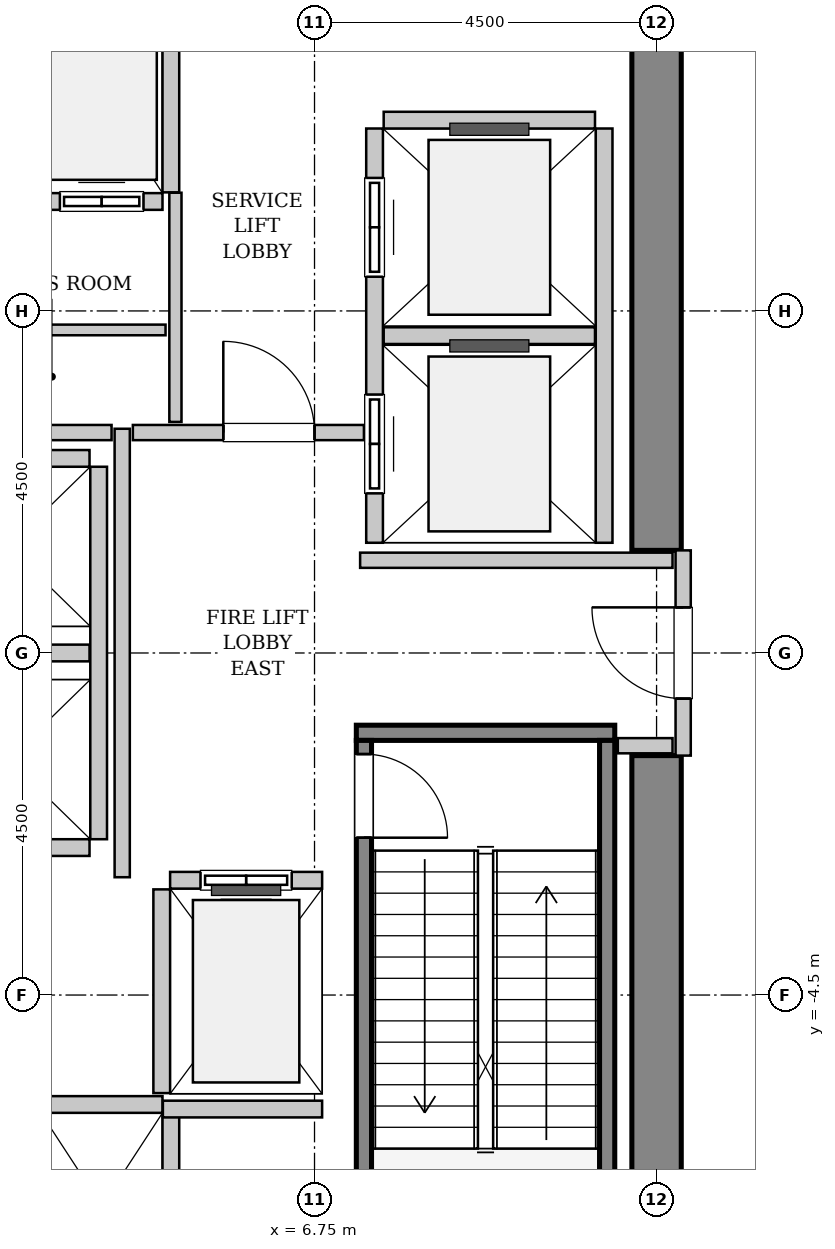
"""IFC4 building model, lengths in metres.
Left out: names, types, materials, properties, quantities, classifications, styles, units other than length and angle.
Written with IfcOpenShell. Run it as: python <this file> out.ifc"""

import sys

from ifc_helpers import new_model, si_unit, direction, frame, frame_2d, origin, place, context, subcontext, project, spatial, rectangle, extrude, source, transform, mapped, element, fill, save


model = new_model("IFC4")
c1 = context("Model", 3, precision=1e-05, world=origin(), true_north=direction((0.0, 1.0)))
c2 = subcontext(c1, "Body", "Model", "MODEL_VIEW")
j1 = project(units=[si_unit("LENGTHUNIT", "METRE"), si_unit("PLANEANGLEUNIT", "RADIAN")], contexts=[c1])
p1 = place(None, origin())
s1 = spatial("IfcSite", under=j1, at=p1, CompositionType="ELEMENT")
p2 = place(p1, origin())
s2 = spatial("IfcBuilding", under=s1, at=p2, CompositionType="ELEMENT")
p3 = place(p2, frame((0.0, 0.0, 6.0)))
s3 = spatial("IfcBuildingStorey", under=s2, at=p3, CompositionType="ELEMENT", Elevation=6.0)
m1 = source(origin(), c2, "Body", "SweptSolid", [
    extrude(rectangle(XDim=7.325, YDim=0.65, at=frame_2d((3.663, 0.0))), origin(), (0.0, 0.0, 1.0), 5.4),
])
for number, where, z_axis, x_axis in (
    (1, (11.25, -8.675, 0.0), (0.0, 0.0, 1.0), (0.0, 1.0, 0.0)),
    (2, (11.25, 1.35, 0.0), (0.0, 0.0, 1.0), (0.0, 1.0, 0.0)),
):
    element("IfcWall", number, at=place(p3, frame(where, z_axis=z_axis, x_axis=x_axis)), inside=s3, PredefinedType="SHEAR", context=c2, shape_type="MappedRepresentation", body=[
        mapped(m1, transform((0.0, 0.0, 0.0), x_axis=(1.0, 0.0, 0.0), y_axis=(0.0, 1.0, 0.0), z_axis=(0.0, 0.0, 1.0), scale=1.0)),
    ])
m2 = source(origin(), c2, "Body", "SweptSolid", [
    extrude(rectangle(XDim=3.4, YDim=0.2, at=frame_2d((1.7, 0.0))), origin(), (0.0, 0.0, 1.0), 5.4),
])
p4 = place(p3, frame((7.3, -1.05, 0.0), z_axis=(0.0, 0.0, 1.0), x_axis=(1.0, 0.0, 0.0)))
e3 = element("IfcWall", 3, at=p4, inside=s3, PredefinedType="SOLIDWALL", context=c2, shape_type="MappedRepresentation", body=[
    mapped(m2, transform((0.0, 0.0, 0.0), x_axis=(1.0, 0.0, 0.0), y_axis=(0.0, 1.0, 0.0), z_axis=(0.0, 0.0, 1.0), scale=1.0)),
])
m3 = source(origin(), c2, "Body", "SweptSolid", [
    extrude(rectangle(XDim=7.1, YDim=0.2, at=frame_2d((3.55, 0.0))), origin(), (0.0, 0.0, 1.0), 5.4),
])
p5 = place(p3, frame((7.4, -1.15, 0.0), z_axis=(0.0, 0.0, 1.0), x_axis=(0.0, -1.0, 0.0)))
e4 = element("IfcWall", 4, at=p5, inside=s3, PredefinedType="SOLIDWALL", context=c2, shape_type="MappedRepresentation", body=[
    mapped(m3, transform((0.0, 0.0, 0.0), x_axis=(1.0, 0.0, 0.0), y_axis=(0.0, 1.0, 0.0), z_axis=(0.0, 0.0, 1.0), scale=1.0)),
])
p6 = place(p5, frame((0.18, 0.0, 0.0)))
e5 = element("IfcOpeningElement", 5, at=p6, cuts=e4, PredefinedType="OPENING", context=c2, shape_type="SweptSolid", body=[
    extrude(rectangle(XDim=1.1, YDim=2.15, at=frame_2d((0.55, 1.075))), frame((0.0, 0.11, 0.0), z_axis=(0.0, -1.0, 0.0), x_axis=(1.0, 0.0, 0.0)), (0.0, 0.0, 1.0), 0.22),
])
p7 = place(p3, frame((10.6, -1.15, 0.0), z_axis=(0.0, 0.0, 1.0), x_axis=(0.0, -1.0, 0.0)))
e6 = element("IfcWall", 6, at=p7, inside=s3, PredefinedType="SOLIDWALL", context=c2, shape_type="MappedRepresentation", body=[
    mapped(m3, transform((0.0, 0.0, 0.0), x_axis=(1.0, 0.0, 0.0), y_axis=(0.0, 1.0, 0.0), z_axis=(0.0, 0.0, 1.0), scale=1.0)),
])
m4 = source(origin(), c2, "Body", "SweptSolid", [
    extrude(rectangle(XDim=2.0, YDim=0.22, at=frame_2d((1.0, 0.0))), origin(), (0.0, 0.0, 1.0), 5.085),
])
p8 = place(p3, frame((6.85, -2.99, 0.0), z_axis=(0.0, 0.0, 1.0), x_axis=(-1.0, 0.0, 0.0)))
e7 = element("IfcWall", 7, at=p8, inside=s3, PredefinedType="SOLIDWALL", context=c2, shape_type="MappedRepresentation", body=[
    mapped(m4, transform((0.0, 0.0, 0.0), x_axis=(1.0, 0.0, 0.0), y_axis=(0.0, 1.0, 0.0), z_axis=(0.0, 0.0, 1.0), scale=1.0)),
])
p9 = place(p8, frame((0.4, 0.0, 0.0)))
e8 = element("IfcOpeningElement", 8, at=p9, cuts=e7, PredefinedType="OPENING", context=c2, shape_type="SweptSolid", body=[
    extrude(rectangle(XDim=1.2, YDim=2.2, at=frame_2d((0.6, 1.1))), frame((0.0, 0.12, 0.0), z_axis=(0.0, -1.0, 0.0), x_axis=(1.0, 0.0, 0.0)), (0.0, 0.0, 1.0), 0.24),
])
m5 = source(origin(), c2, "Body", "SweptSolid", [
    extrude(rectangle(XDim=2.68, YDim=0.22, at=frame_2d((1.34, 0.0))), origin(), (0.0, 0.0, 1.0), 5.085),
])
p10 = place(p3, frame((4.74, -3.11, 0.0), z_axis=(0.0, 0.0, 1.0), x_axis=(0.0, -1.0, 0.0)))
e9 = element("IfcWall", 9, at=p10, inside=s3, PredefinedType="SOLIDWALL", context=c2, shape_type="MappedRepresentation", body=[
    mapped(m5, transform((0.0, 0.0, 0.0), x_axis=(1.0, 0.0, 0.0), y_axis=(0.0, 1.0, 0.0), z_axis=(0.0, 0.0, 1.0), scale=1.0)),
])
m6 = source(origin(), c2, "Body", "SweptSolid", [
    extrude(rectangle(XDim=5.45, YDim=0.22, at=frame_2d((2.725, 0.0))), origin(), (0.0, 0.0, 1.0), 5.085),
])
p11 = place(p3, frame((7.54, 6.9, 0.0), z_axis=(0.0, 0.0, 1.0), x_axis=(0.0, -1.0, 0.0)))
e10 = element("IfcWall", 10, at=p11, inside=s3, PredefinedType="SOLIDWALL", context=c2, shape_type="MappedRepresentation", body=[
    mapped(m6, transform((0.0, 0.0, 0.0), x_axis=(1.0, 0.0, 0.0), y_axis=(0.0, 1.0, 0.0), z_axis=(0.0, 0.0, 1.0), scale=1.0)),
])
p12 = place(p11, frame((3.5, 0.0, 0.0)))
e11 = element("IfcOpeningElement", 11, at=p12, cuts=e10, PredefinedType="OPENING", context=c2, shape_type="SweptSolid", body=[
    extrude(rectangle(XDim=1.3, YDim=2.3, at=frame_2d((0.65, 1.15))), frame((0.0, 0.12, 0.0), z_axis=(0.0, -1.0, 0.0), x_axis=(1.0, 0.0, 0.0)), (0.0, 0.0, 1.0), 0.24),
])
p13 = place(p11, frame((0.65, 0.0, 0.0)))
e12 = element("IfcOpeningElement", 12, at=p13, cuts=e10, PredefinedType="OPENING", context=c2, shape_type="SweptSolid", body=[
    extrude(rectangle(XDim=1.3, YDim=2.3, at=frame_2d((0.65, 1.15))), frame((0.0, 0.12, 0.0), z_axis=(0.0, -1.0, 0.0), x_axis=(1.0, 0.0, 0.0)), (0.0, 0.0, 1.0), 0.24),
])
p14 = place(p3, frame((10.56, 1.45, 0.0), z_axis=(0.0, 0.0, 1.0), x_axis=(0.0, 1.0, 0.0)))
e13 = element("IfcWall", 13, at=p14, inside=s3, PredefinedType="SOLIDWALL", context=c2, shape_type="MappedRepresentation", body=[
    mapped(m6, transform((0.0, 0.0, 0.0), x_axis=(1.0, 0.0, 0.0), y_axis=(0.0, 1.0, 0.0), z_axis=(0.0, 0.0, 1.0), scale=1.0)),
])
m7 = source(origin(), c2, "Body", "SweptSolid", [
    extrude(rectangle(XDim=2.78, YDim=0.22, at=frame_2d((1.39, 0.0))), origin(), (0.0, 0.0, 1.0), 5.085),
])
for number, where, z_axis, x_axis in (
    (14, (7.66, 4.175, 0.0), (0.0, 0.0, 1.0), (1.0, 0.0, 0.0)),
    (15, (10.44, 7.01, 0.0), (0.0, 0.0, 1.0), (-1.0, 0.0, 0.0)),
):
    element("IfcWall", number, at=place(p3, frame(where, z_axis=z_axis, x_axis=x_axis)), inside=s3, PredefinedType="SOLIDWALL", context=c2, shape_type="MappedRepresentation", body=[
        mapped(m7, transform((0.0, 0.0, 0.0), x_axis=(1.0, 0.0, 0.0), y_axis=(0.0, 1.0, 0.0), z_axis=(0.0, 0.0, 1.0), scale=1.0)),
    ])
m8 = source(origin(), c2, "Body", "SweptSolid", [
    extrude(rectangle(XDim=3.2, YDim=0.22, at=frame_2d((1.6, 0.0))), origin(), (0.0, 0.0, 1.0), 5.085),
])
p15 = place(p3, frame((1.55, 5.94, 0.0), z_axis=(0.0, 0.0, 1.0), x_axis=(1.0, 0.0, 0.0)))
e16 = element("IfcWall", 16, at=p15, inside=s3, PredefinedType="SOLIDWALL", context=c2, shape_type="MappedRepresentation", body=[
    mapped(m8, transform((0.0, 0.0, 0.0), x_axis=(1.0, 0.0, 0.0), y_axis=(0.0, 1.0, 0.0), z_axis=(0.0, 0.0, 1.0), scale=1.0)),
])
p16 = place(p15, frame((0.225, 0.0, 0.0)))
e17 = element("IfcOpeningElement", 17, at=p16, cuts=e16, PredefinedType="OPENING", context=c2, shape_type="SweptSolid", body=[
    extrude(rectangle(XDim=1.1, YDim=2.2, at=frame_2d((0.55, 1.1))), frame((0.0, 0.12, 0.0), z_axis=(0.0, -1.0, 0.0), x_axis=(1.0, 0.0, 0.0)), (0.0, 0.0, 1.0), 0.24),
])
p17 = place(p15, frame((1.85, 0.0, 0.0)))
e18 = element("IfcOpeningElement", 18, at=p17, cuts=e16, PredefinedType="OPENING", context=c2, shape_type="SweptSolid", body=[
    extrude(rectangle(XDim=1.1, YDim=2.2, at=frame_2d((0.55, 1.1))), frame((0.0, 0.12, 0.0), z_axis=(0.0, -1.0, 0.0), x_axis=(1.0, 0.0, 0.0)), (0.0, 0.0, 1.0), 0.24),
])
m9 = source(origin(), c2, "Body", "SweptSolid", [
    extrude(rectangle(XDim=2.43, YDim=0.22, at=frame_2d((1.215, 0.0))), origin(), (0.0, 0.0, 1.0), 5.085),
])
p18 = place(p3, frame((4.86, 6.06, 0.0), z_axis=(0.0, 0.0, 1.0), x_axis=(0.0, 1.0, 0.0)))
e19 = element("IfcWall", 19, at=p18, inside=s3, PredefinedType="SOLIDWALL", context=c2, shape_type="MappedRepresentation", body=[
    mapped(m9, transform((0.0, 0.0, 0.0), x_axis=(1.0, 0.0, 0.0), y_axis=(0.0, 1.0, 0.0), z_axis=(0.0, 0.0, 1.0), scale=1.0)),
])
p19 = place(p3, frame((4.75, -5.94, 0.0), z_axis=(0.0, 0.0, 1.0), x_axis=(-1.0, 0.0, 0.0)))
e20 = element("IfcWall", 20, at=p19, inside=s3, PredefinedType="SOLIDWALL", context=c2, shape_type="MappedRepresentation", body=[
    mapped(m8, transform((0.0, 0.0, 0.0), x_axis=(1.0, 0.0, 0.0), y_axis=(0.0, 1.0, 0.0), z_axis=(0.0, 0.0, 1.0), scale=1.0)),
])
p20 = place(p3, frame((4.86, -8.49, 0.0), z_axis=(0.0, 0.0, 1.0), x_axis=(0.0, 1.0, 0.0)))
e21 = element("IfcWall", 21, at=p20, inside=s3, PredefinedType="SOLIDWALL", context=c2, shape_type="MappedRepresentation", body=[
    mapped(m9, transform((0.0, 0.0, 0.0), x_axis=(1.0, 0.0, 0.0), y_axis=(0.0, 1.0, 0.0), z_axis=(0.0, 0.0, 1.0), scale=1.0)),
])
m10 = source(origin(), c2, "Body", "SweptSolid", [
    extrude(rectangle(XDim=4.9, YDim=0.22, at=frame_2d((2.45, 0.0))), origin(), (0.0, 0.0, 1.0), 5.085),
])
p21 = place(p3, frame((3.91, -2.45, 0.0), z_axis=(0.0, 0.0, 1.0), x_axis=(0.0, 1.0, 0.0)))
e22 = element("IfcWall", 22, at=p21, inside=s3, PredefinedType="SOLIDWALL", context=c2, shape_type="MappedRepresentation", body=[
    mapped(m10, transform((0.0, 0.0, 0.0), x_axis=(1.0, 0.0, 0.0), y_axis=(0.0, 1.0, 0.0), z_axis=(0.0, 0.0, 1.0), scale=1.0)),
])
m11 = source(origin(), c2, "Body", "SweptSolid", [
    extrude(rectangle(XDim=2.13, YDim=0.22, at=frame_2d((1.065, 0.0))), origin(), (0.0, 0.0, 1.0), 5.085),
])
for number, where, z_axis, x_axis in (
    (23, (1.66, -2.56, 0.0), (0.0, 0.0, 1.0), (1.0, 0.0, 0.0)),
    (24, (1.66, 0.0, 0.0), (0.0, 0.0, 1.0), (1.0, 0.0, 0.0)),
    (25, (3.79, 2.56, 0.0), (0.0, 0.0, 1.0), (-1.0, 0.0, 0.0)),
):
    element("IfcWall", number, at=place(p3, frame(where, z_axis=z_axis, x_axis=x_axis)), inside=s3, PredefinedType="SOLIDWALL", context=c2, shape_type="MappedRepresentation", body=[
        mapped(m11, transform((0.0, 0.0, 0.0), x_axis=(1.0, 0.0, 0.0), y_axis=(0.0, 1.0, 0.0), z_axis=(0.0, 0.0, 1.0), scale=1.0)),
    ])
m12 = source(origin(), c2, "Body", "SweptSolid", [
    extrude(rectangle(XDim=2.095, YDim=0.22, at=frame_2d((1.048, 0.0))), origin(), (0.0, 0.0, 1.0), 5.085),
])
p22 = place(p3, frame((4.755, -6.0, 0.0), z_axis=(0.0, 0.0, 1.0), x_axis=(1.0, 0.0, 0.0)))
e26 = element("IfcWall", 26, at=p22, inside=s3, PredefinedType="SOLIDWALL", context=c2, shape_type="MappedRepresentation", body=[
    mapped(m12, transform((0.0, 0.0, 0.0), x_axis=(1.0, 0.0, 0.0), y_axis=(0.0, 1.0, 0.0), z_axis=(0.0, 0.0, 1.0), scale=1.0)),
])
m13 = source(origin(), c2, "Body", "SweptSolid", [
    extrude(rectangle(XDim=2.7, YDim=0.2, at=frame_2d((1.35, 0.0))), origin(), (0.0, 0.0, 1.0), 3.975),
])
p23 = place(p3, frame((11.6, -1.35, 0.0), z_axis=(0.0, 0.0, 1.0), x_axis=(0.0, 1.0, 0.0)))
e27 = element("IfcWall", 27, at=p23, inside=s3, PredefinedType="PARTITIONING", context=c2, shape_type="MappedRepresentation", body=[
    mapped(m13, transform((0.0, 0.0, 0.0), x_axis=(1.0, 0.0, 0.0), y_axis=(0.0, 1.0, 0.0), z_axis=(0.0, 0.0, 1.0), scale=1.0)),
])
p24 = place(p23, frame((0.75, 0.0, 0.0)))
e28 = element("IfcOpeningElement", 28, at=p24, cuts=e27, PredefinedType="OPENING", context=c2, shape_type="SweptSolid", body=[
    extrude(rectangle(XDim=1.2, YDim=2.15, at=frame_2d((0.6, 1.075))), frame((0.0, 0.11, 0.0), z_axis=(0.0, -1.0, 0.0), x_axis=(1.0, 0.0, 0.0)), (0.0, 0.0, 1.0), 0.22),
])
m14 = source(origin(), c2, "Body", "SweptSolid", [
    extrude(rectangle(XDim=5.9, YDim=0.2, at=frame_2d((2.95, 0.0))), origin(), (0.0, 0.0, 1.0), 5.085),
])
p25 = place(p3, frame((4.22, -2.95, 0.0), z_axis=(0.0, 0.0, 1.0), x_axis=(0.0, 1.0, 0.0)))
e29 = element("IfcWall", 29, at=p25, inside=s3, PredefinedType="PARTITIONING", context=c2, shape_type="MappedRepresentation", body=[
    mapped(m14, transform((0.0, 0.0, 0.0), x_axis=(1.0, 0.0, 0.0), y_axis=(0.0, 1.0, 0.0), z_axis=(0.0, 0.0, 1.0), scale=1.0)),
])
m15 = source(origin(), c2, "Body", "SweptSolid", [
    extrude(rectangle(XDim=2.52, YDim=0.2, at=frame_2d((1.26, 0.0))), origin(), (0.0, 0.0, 1.0), 5.085),
])
p26 = place(p3, frame((1.56, 2.9, 0.0), z_axis=(0.0, 0.0, 1.0), x_axis=(1.0, 0.0, 0.0)))
e30 = element("IfcWall", 30, at=p26, inside=s3, PredefinedType="PARTITIONING", context=c2, shape_type="MappedRepresentation", body=[
    mapped(m15, transform((0.0, 0.0, 0.0), x_axis=(1.0, 0.0, 0.0), y_axis=(0.0, 1.0, 0.0), z_axis=(0.0, 0.0, 1.0), scale=1.0)),
])
m16 = source(origin(), c2, "Body", "SweptSolid", [
    extrude(rectangle(XDim=3.04, YDim=0.2, at=frame_2d((1.52, 0.0))), origin(), (0.0, 0.0, 1.0), 5.085),
])
p27 = place(p3, frame((4.36, 2.9, 0.0), z_axis=(0.0, 0.0, 1.0), x_axis=(1.0, 0.0, 0.0)))
e31 = element("IfcWall", 31, at=p27, inside=s3, PredefinedType="PARTITIONING", context=c2, shape_type="MappedRepresentation", body=[
    mapped(m16, transform((0.0, 0.0, 0.0), x_axis=(1.0, 0.0, 0.0), y_axis=(0.0, 1.0, 0.0), z_axis=(0.0, 0.0, 1.0), scale=1.0)),
])
p28 = place(p27, frame((1.19, 0.0, 0.0)))
e32 = element("IfcOpeningElement", 32, at=p28, cuts=e31, PredefinedType="OPENING", context=c2, shape_type="SweptSolid", body=[
    extrude(rectangle(XDim=1.2, YDim=2.15, at=frame_2d((0.6, 1.075))), frame((0.0, 0.11, 0.0), z_axis=(0.0, -1.0, 0.0), x_axis=(1.0, 0.0, 0.0)), (0.0, 0.0, 1.0), 0.22),
])
m17 = source(origin(), c2, "Body", "SweptSolid", [
    extrude(rectangle(XDim=4.11, YDim=0.2, at=frame_2d((2.055, 0.0))), origin(), (0.0, 0.0, 1.0), 5.085),
])
p29 = place(p3, frame((7.35, 1.22, 0.0), z_axis=(0.0, 0.0, 1.0), x_axis=(1.0, 0.0, 0.0)))
e33 = element("IfcWall", 33, at=p29, inside=s3, PredefinedType="PARTITIONING", context=c2, shape_type="MappedRepresentation", body=[
    mapped(m17, transform((0.0, 0.0, 0.0), x_axis=(1.0, 0.0, 0.0), y_axis=(0.0, 1.0, 0.0), z_axis=(0.0, 0.0, 1.0), scale=1.0)),
])
m18 = source(origin(), c2, "Body", "SweptSolid", [
    extrude(rectangle(XDim=0.72, YDim=0.2, at=frame_2d((0.36, 0.0))), origin(), (0.0, 0.0, 1.0), 5.085),
])
p30 = place(p3, frame((10.74, -1.22, 0.0), z_axis=(0.0, 0.0, 1.0), x_axis=(1.0, 0.0, 0.0)))
e34 = element("IfcWall", 34, at=p30, inside=s3, PredefinedType="PARTITIONING", context=c2, shape_type="MappedRepresentation", body=[
    mapped(m18, transform((0.0, 0.0, 0.0), x_axis=(1.0, 0.0, 0.0), y_axis=(0.0, 1.0, 0.0), z_axis=(0.0, 0.0, 1.0), scale=1.0)),
])
m19 = source(origin(), c2, "Body", "SweptSolid", [
    extrude(rectangle(XDim=3.015, YDim=0.16, at=frame_2d((1.507, 0.0))), origin(), (0.0, 0.0, 1.0), 5.085),
])
p31 = place(p3, frame((4.92, 3.04, 0.0), z_axis=(0.0, 0.0, 1.0), x_axis=(0.0, 1.0, 0.0)))
e35 = element("IfcWall", 35, at=p31, inside=s3, PredefinedType="PARTITIONING", context=c2, shape_type="MappedRepresentation", body=[
    mapped(m19, transform((0.0, 0.0, 0.0), x_axis=(1.0, 0.0, 0.0), y_axis=(0.0, 1.0, 0.0), z_axis=(0.0, 0.0, 1.0), scale=1.0)),
])
m20 = source(origin(), c2, "Body", "SweptSolid", [
    extrude(rectangle(XDim=3.15, YDim=0.14, at=frame_2d((1.575, 0.0))), origin(), (0.0, 0.0, 1.0), 5.085),
])
p32 = place(p3, frame((1.64, 4.25, 0.0), z_axis=(0.0, 0.0, 1.0), x_axis=(1.0, 0.0, 0.0)))
e36 = element("IfcWall", 36, at=p32, inside=s3, PredefinedType="PARTITIONING", context=c2, shape_type="MappedRepresentation", body=[
    mapped(m20, transform((0.0, 0.0, 0.0), x_axis=(1.0, 0.0, 0.0), y_axis=(0.0, 1.0, 0.0), z_axis=(0.0, 0.0, 1.0), scale=1.0)),
])
m21 = source(origin(), c2, "Body", "SweptSolid", [
    extrude(rectangle(XDim=1.1, YDim=2.15, at=frame_2d((0.55, 1.075))), frame((0.0, 0.025, 0.0), z_axis=(0.0, -1.0, 0.0), x_axis=(1.0, 0.0, 0.0)), (0.0, 0.0, 1.0), 0.05),
])
p33 = place(p6, origin())
e37 = element("IfcDoor", 37, at=p33, inside=s3, OperationType="SINGLE_SWING_RIGHT", PredefinedType="DOOR", context=c2, shape_type="MappedRepresentation", body=[
    mapped(m21, transform((0.0, 0.0, 0.0), x_axis=(1.0, 0.0, 0.0), y_axis=(0.0, 1.0, 0.0), z_axis=(0.0, 0.0, 1.0), scale=1.0)),
])
fill(e5, e37)
m22 = source(origin(), c2, "Body", "SweptSolid", [
    extrude(rectangle(XDim=1.2, YDim=2.2, at=frame_2d((0.6, 1.1))), frame((0.0, 0.025, 0.0), z_axis=(0.0, -1.0, 0.0), x_axis=(1.0, 0.0, 0.0)), (0.0, 0.0, 1.0), 0.05),
])
p34 = place(p9, origin())
e38 = element("IfcDoor", 38, at=p34, inside=s3, OperationType="SLIDING_TO_LEFT", PredefinedType="DOOR", context=c2, shape_type="MappedRepresentation", body=[
    mapped(m22, transform((0.0, 0.0, 0.0), x_axis=(1.0, 0.0, 0.0), y_axis=(0.0, 1.0, 0.0), z_axis=(0.0, 0.0, 1.0), scale=1.0)),
])
fill(e8, e38)
m23 = source(origin(), c2, "Body", "SweptSolid", [
    extrude(rectangle(XDim=1.3, YDim=2.3, at=frame_2d((0.65, 1.15))), frame((0.0, 0.025, 0.0), z_axis=(0.0, -1.0, 0.0), x_axis=(1.0, 0.0, 0.0)), (0.0, 0.0, 1.0), 0.05),
])
p35 = place(p12, origin())
e39 = element("IfcDoor", 39, at=p35, inside=s3, OperationType="SLIDING_TO_RIGHT", PredefinedType="DOOR", context=c2, shape_type="MappedRepresentation", body=[
    mapped(m23, transform((0.0, 0.0, 0.0), x_axis=(1.0, 0.0, 0.0), y_axis=(0.0, 1.0, 0.0), z_axis=(0.0, 0.0, 1.0), scale=1.0)),
])
fill(e11, e39)
p36 = place(p13, origin())
e40 = element("IfcDoor", 40, at=p36, inside=s3, OperationType="SLIDING_TO_RIGHT", PredefinedType="DOOR", context=c2, shape_type="MappedRepresentation", body=[
    mapped(m23, transform((0.0, 0.0, 0.0), x_axis=(1.0, 0.0, 0.0), y_axis=(0.0, 1.0, 0.0), z_axis=(0.0, 0.0, 1.0), scale=1.0)),
])
fill(e12, e40)
m24 = source(origin(), c2, "Body", "SweptSolid", [
    extrude(rectangle(XDim=1.1, YDim=2.2, at=frame_2d((0.55, 1.1))), frame((0.0, 0.025, 0.0), z_axis=(0.0, -1.0, 0.0), x_axis=(1.0, 0.0, 0.0)), (0.0, 0.0, 1.0), 0.05),
])
p37 = place(p17, origin())
e41 = element("IfcDoor", 41, at=p37, inside=s3, OperationType="DOUBLE_DOOR_SLIDING", PredefinedType="DOOR", context=c2, shape_type="MappedRepresentation", body=[
    mapped(m24, transform((0.0, 0.0, 0.0), x_axis=(1.0, 0.0, 0.0), y_axis=(0.0, 1.0, 0.0), z_axis=(0.0, 0.0, 1.0), scale=1.0)),
])
fill(e18, e41)
m25 = source(origin(), c2, "Body", "SweptSolid", [
    extrude(rectangle(XDim=1.2, YDim=2.15, at=frame_2d((0.6, 1.075))), frame((0.0, 0.025, 0.0), z_axis=(0.0, -1.0, 0.0), x_axis=(1.0, 0.0, 0.0)), (0.0, 0.0, 1.0), 0.05),
])
p38 = place(p24, origin())
e42 = element("IfcDoor", 42, at=p38, inside=s3, OperationType="SINGLE_SWING_RIGHT", PredefinedType="DOOR", context=c2, shape_type="MappedRepresentation", body=[
    mapped(m25, transform((0.0, 0.0, 0.0), x_axis=(1.0, 0.0, 0.0), y_axis=(0.0, 1.0, 0.0), z_axis=(0.0, 0.0, 1.0), scale=1.0)),
])
fill(e28, e42)
p39 = place(p28, origin())
e43 = element("IfcDoor", 43, at=p39, inside=s3, OperationType="SINGLE_SWING_LEFT", PredefinedType="DOOR", context=c2, shape_type="MappedRepresentation", body=[
    mapped(m25, transform((0.0, 0.0, 0.0), x_axis=(1.0, 0.0, 0.0), y_axis=(0.0, 1.0, 0.0), z_axis=(0.0, 0.0, 1.0), scale=1.0)),
])
fill(e32, e43)
save(model, sys.argv[1])
